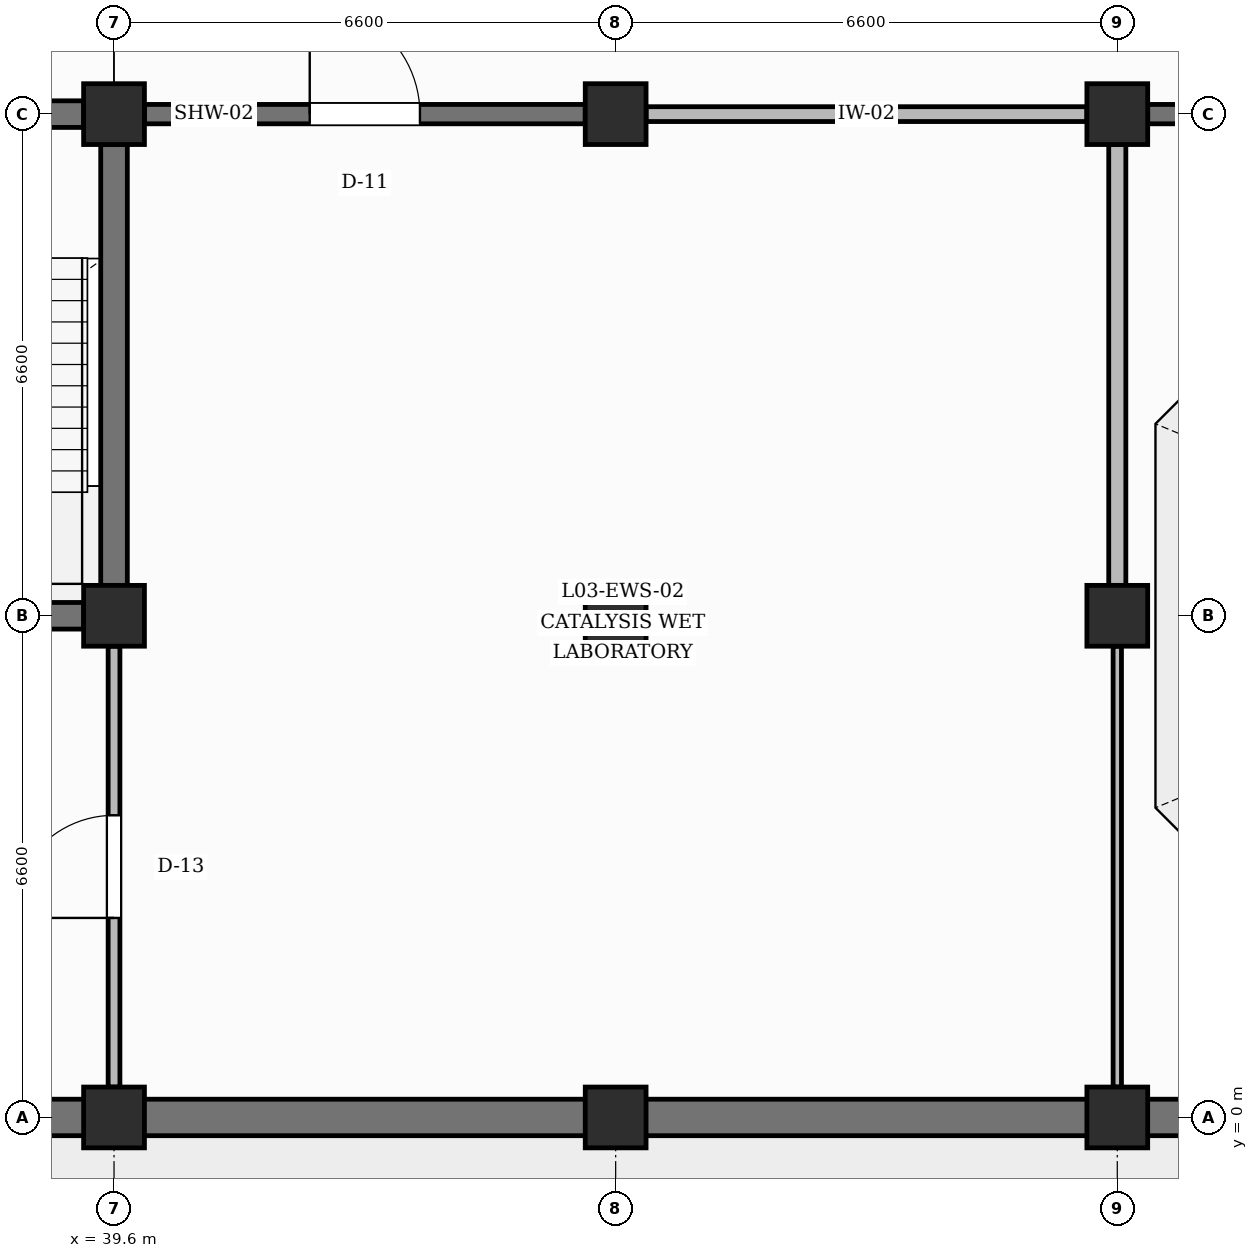
"""IFC4 building model, lengths in metres.
Left out: names, types, materials, properties, quantities, classifications, styles, units other than length and angle.
Written with IfcOpenShell. Run it as: python <this file> out.ifc"""

import sys

from ifc_helpers import new_model, si_unit, direction, frame, frame_2d, origin, origin_2d, place, context, subcontext, project, spatial, rectangle, extrude, element, fill, save


model = new_model("IFC4")
c1 = context("Model", 3, precision=1e-05, world=origin(), true_north=direction((0.0, 1.0)))
c2 = subcontext(c1, "Body", "Model", "MODEL_VIEW")
j1 = project(units=[si_unit("LENGTHUNIT", "METRE"), si_unit("PLANEANGLEUNIT", "RADIAN")], contexts=[c1])
p1 = place(None, origin())
s1 = spatial("IfcSite", under=j1, at=p1, CompositionType="ELEMENT")
p2 = place(p1, origin())
s2 = spatial("IfcBuilding", under=s1, at=p2, CompositionType="ELEMENT")
p3 = place(p2, frame((0.0, 0.0, 14.4)))
s3 = spatial("IfcBuildingStorey", under=s2, at=p3, CompositionType="ELEMENT", Elevation=14.4)
for number, where, z_axis, x_axis in (
    (1, (39.6, 0.0, 0.0), (0.0, 0.0, 1.0), (1.0, 0.0, 0.0)),
    (2, (39.6, 6.6, 0.0), (0.0, 0.0, 1.0), (1.0, 0.0, 0.0)),
    (3, (39.6, 13.2, 0.0), (0.0, 0.0, 1.0), (1.0, 0.0, 0.0)),
    (4, (46.2, 0.0, 0.0), (0.0, 0.0, 1.0), (1.0, 0.0, 0.0)),
    (5, (46.2, 6.6, 0.0), (0.0, 0.0, 1.0), (1.0, 0.0, 0.0)),
    (6, (46.2, 13.2, 0.0), (0.0, 0.0, 1.0), (1.0, 0.0, 0.0)),
    (7, (52.8, 0.0, 0.0), (0.0, 0.0, 1.0), (1.0, 0.0, 0.0)),
    (8, (52.8, 6.6, 0.0), (0.0, 0.0, 1.0), (1.0, 0.0, 0.0)),
    (9, (52.8, 13.2, 0.0), (0.0, 0.0, 1.0), (1.0, 0.0, 0.0)),
):
    element("IfcColumn", number, at=place(p3, frame(where, z_axis=z_axis, x_axis=x_axis)), inside=s3, PredefinedType="COLUMN", context=c2, shape_type="SweptSolid", body=[
        extrude(rectangle(XDim=0.8, YDim=0.8, at=origin_2d()), origin(), (0.0, 0.0, 1.0), 4.2),
    ])
p4 = place(p3, frame((33.425, 0.0, 0.0), z_axis=(0.0, 0.0, 1.0), x_axis=(1.0, 0.0, 0.0)))
e10 = element("IfcWall", 10, at=p4, inside=s3, PredefinedType="SOLIDWALL", context=c2, shape_type="SweptSolid", body=[
    extrude(rectangle(XDim=5.775, YDim=0.48, at=frame_2d((2.887, 0.0))), origin(), (0.0, 0.0, 1.0), 3.26),
])
p5 = place(p3, frame((40.0, 0.0, 0.0), z_axis=(0.0, 0.0, 1.0), x_axis=(1.0, 0.0, 0.0)))
e11 = element("IfcWall", 11, at=p5, inside=s3, PredefinedType="SOLIDWALL", context=c2, shape_type="SweptSolid", body=[
    extrude(rectangle(XDim=5.8, YDim=0.48, at=frame_2d((2.9, 0.0))), origin(), (0.0, 0.0, 1.0), 3.26),
])
p6 = place(p3, frame((46.6, 0.0, 0.0), z_axis=(0.0, 0.0, 1.0), x_axis=(1.0, 0.0, 0.0)))
e12 = element("IfcWall", 12, at=p6, inside=s3, PredefinedType="SOLIDWALL", context=c2, shape_type="SweptSolid", body=[
    extrude(rectangle(XDim=5.8, YDim=0.48, at=frame_2d((2.9, 0.0))), origin(), (0.0, 0.0, 1.0), 3.26),
])
p7 = place(p3, frame((53.2, 0.0, 0.0), z_axis=(0.0, 0.0, 1.0), x_axis=(1.0, 0.0, 0.0)))
e13 = element("IfcWall", 13, at=p7, inside=s3, PredefinedType="SOLIDWALL", context=c2, shape_type="SweptSolid", body=[
    extrude(rectangle(XDim=5.8, YDim=0.48, at=frame_2d((2.9, 0.0))), origin(), (0.0, 0.0, 1.0), 3.26),
])
p8 = place(p3, frame((33.425, 6.6, 0.0), z_axis=(0.0, 0.0, 1.0), x_axis=(1.0, 0.0, 0.0)))
e14 = element("IfcWall", 14, at=p8, inside=s3, PredefinedType="SHEAR", context=c2, shape_type="SweptSolid", body=[
    extrude(rectangle(XDim=5.775, YDim=0.35, at=frame_2d((2.887, 0.0))), origin(), (0.0, 0.0, 1.0), 3.16),
])
p9 = place(p3, frame((33.425, 13.2, 0.0), z_axis=(0.0, 0.0, 1.0), x_axis=(1.0, 0.0, 0.0)))
e15 = element("IfcWall", 15, at=p9, inside=s3, PredefinedType="SHEAR", context=c2, shape_type="SweptSolid", body=[
    extrude(rectangle(XDim=5.775, YDim=0.35, at=frame_2d((2.887, 0.0))), origin(), (0.0, 0.0, 1.0), 3.16),
])
p10 = place(p9, frame((2.337, 0.0, 0.0)))
e16 = element("IfcOpeningElement", 16, at=p10, cuts=e15, PredefinedType="OPENING", context=c2, shape_type="SweptSolid", body=[
    extrude(rectangle(XDim=1.1, YDim=2.15, at=frame_2d((0.55, 1.075))), frame((0.0, 0.185, 0.0), z_axis=(0.0, -1.0, 0.0), x_axis=(1.0, 0.0, 0.0)), (0.0, 0.0, 1.0), 0.37),
])
p11 = place(p3, frame((39.6, 7.0, 0.0), z_axis=(0.0, 0.0, 1.0), x_axis=(0.0, 1.0, 0.0)))
e17 = element("IfcWall", 17, at=p11, inside=s3, PredefinedType="SHEAR", context=c2, shape_type="SweptSolid", body=[
    extrude(rectangle(XDim=5.8, YDim=0.35, at=frame_2d((2.9, 0.0))), origin(), (0.0, 0.0, 1.0), 3.16),
])
p12 = place(p3, frame((39.6, 0.4, 0.0), z_axis=(0.0, 0.0, 1.0), x_axis=(0.0, 1.0, 0.0)))
e18 = element("IfcWall", 18, at=p12, inside=s3, PredefinedType="PARTITIONING", context=c2, shape_type="SweptSolid", body=[
    extrude(rectangle(XDim=5.8, YDim=0.155, at=frame_2d((2.9, 0.0))), origin(), (0.0, 0.0, 1.0), 3.16),
])
p13 = place(p12, frame((2.225, 0.0, 0.0)))
e19 = element("IfcOpeningElement", 19, at=p13, cuts=e18, PredefinedType="OPENING", context=c2, shape_type="SweptSolid", body=[
    extrude(rectangle(XDim=1.35, YDim=2.3, at=frame_2d((0.675, 1.15))), frame((0.0, 0.087, 0.0), z_axis=(0.0, -1.0, 0.0), x_axis=(1.0, 0.0, 0.0)), (0.0, 0.0, 1.0), 0.175),
])
p14 = place(p3, frame((40.0, 13.2, 0.0), z_axis=(0.0, 0.0, 1.0), x_axis=(1.0, 0.0, 0.0)))
e20 = element("IfcWall", 20, at=p14, inside=s3, PredefinedType="SHEAR", context=c2, shape_type="SweptSolid", body=[
    extrude(rectangle(XDim=5.8, YDim=0.255, at=frame_2d((2.9, 0.0))), origin(), (0.0, 0.0, 1.0), 3.16),
])
p15 = place(p14, frame((2.175, 0.0, 0.0)))
e21 = element("IfcOpeningElement", 21, at=p15, cuts=e20, PredefinedType="OPENING", context=c2, shape_type="SweptSolid", body=[
    extrude(rectangle(XDim=1.45, YDim=2.25, at=frame_2d((0.725, 1.125))), frame((0.0, 0.137, 0.0), z_axis=(0.0, -1.0, 0.0), x_axis=(1.0, 0.0, 0.0)), (0.0, 0.0, 1.0), 0.275),
])
p16 = place(p3, frame((52.8, 0.4, 0.0), z_axis=(0.0, 0.0, 1.0), x_axis=(0.0, 1.0, 0.0)))
e22 = element("IfcWall", 22, at=p16, inside=s3, PredefinedType="PARTITIONING", context=c2, shape_type="SweptSolid", body=[
    extrude(rectangle(XDim=5.8, YDim=0.11, at=frame_2d((2.9, 0.0))), origin(), (0.0, 0.0, 1.0), 3.16),
])
p17 = place(p3, frame((52.8, 7.0, 0.0), z_axis=(0.0, 0.0, 1.0), x_axis=(0.0, 1.0, 0.0)))
e23 = element("IfcWall", 23, at=p17, inside=s3, PredefinedType="PARTITIONING", context=c2, shape_type="SweptSolid", body=[
    extrude(rectangle(XDim=5.8, YDim=0.225, at=frame_2d((2.9, 0.0))), origin(), (0.0, 0.0, 1.0), 3.16),
])
p18 = place(p3, frame((46.6, 13.2, 0.0), z_axis=(0.0, 0.0, 1.0), x_axis=(1.0, 0.0, 0.0)))
e24 = element("IfcWall", 24, at=p18, inside=s3, PredefinedType="PARTITIONING", context=c2, shape_type="SweptSolid", body=[
    extrude(rectangle(XDim=5.8, YDim=0.195, at=frame_2d((2.9, 0.0))), origin(), (0.0, 0.0, 1.0), 3.16),
])
p19 = place(p3, frame((53.2, 13.2, 0.0), z_axis=(0.0, 0.0, 1.0), x_axis=(1.0, 0.0, 0.0)))
e25 = element("IfcWall", 25, at=p19, inside=s3, PredefinedType="SHEAR", context=c2, shape_type="SweptSolid", body=[
    extrude(rectangle(XDim=5.8, YDim=0.255, at=frame_2d((2.9, 0.0))), origin(), (0.0, 0.0, 1.0), 3.16),
])
p20 = place(p19, frame((2.2, 0.0, 0.0)))
e26 = element("IfcOpeningElement", 26, at=p20, cuts=e25, PredefinedType="OPENING", context=c2, shape_type="SweptSolid", body=[
    extrude(rectangle(XDim=1.4, YDim=2.25, at=frame_2d((0.7, 1.125))), frame((0.0, 0.137, 0.0), z_axis=(0.0, -1.0, 0.0), x_axis=(1.0, 0.0, 0.0)), (0.0, 0.0, 1.0), 0.275),
])
p21 = place(p15, origin())
e27 = element("IfcDoor", 27, at=p21, inside=s3, OperationType="SINGLE_SWING_LEFT", PredefinedType="DOOR", context=c2, shape_type="SweptSolid", body=[
    extrude(rectangle(XDim=1.45, YDim=2.25, at=frame_2d((0.725, 1.125))), frame((0.0, 0.025, 0.0), z_axis=(0.0, -1.0, 0.0), x_axis=(1.0, 0.0, 0.0)), (0.0, 0.0, 1.0), 0.05),
])
fill(e21, e27)
p22 = place(p13, origin())
e28 = element("IfcDoor", 28, at=p22, inside=s3, OperationType="SINGLE_SWING_LEFT", PredefinedType="DOOR", context=c2, shape_type="SweptSolid", body=[
    extrude(rectangle(XDim=1.35, YDim=2.3, at=frame_2d((0.675, 1.15))), frame((0.0, 0.025, 0.0), z_axis=(0.0, -1.0, 0.0), x_axis=(1.0, 0.0, 0.0)), (0.0, 0.0, 1.0), 0.05),
])
fill(e19, e28)
save(model, sys.argv[1])
